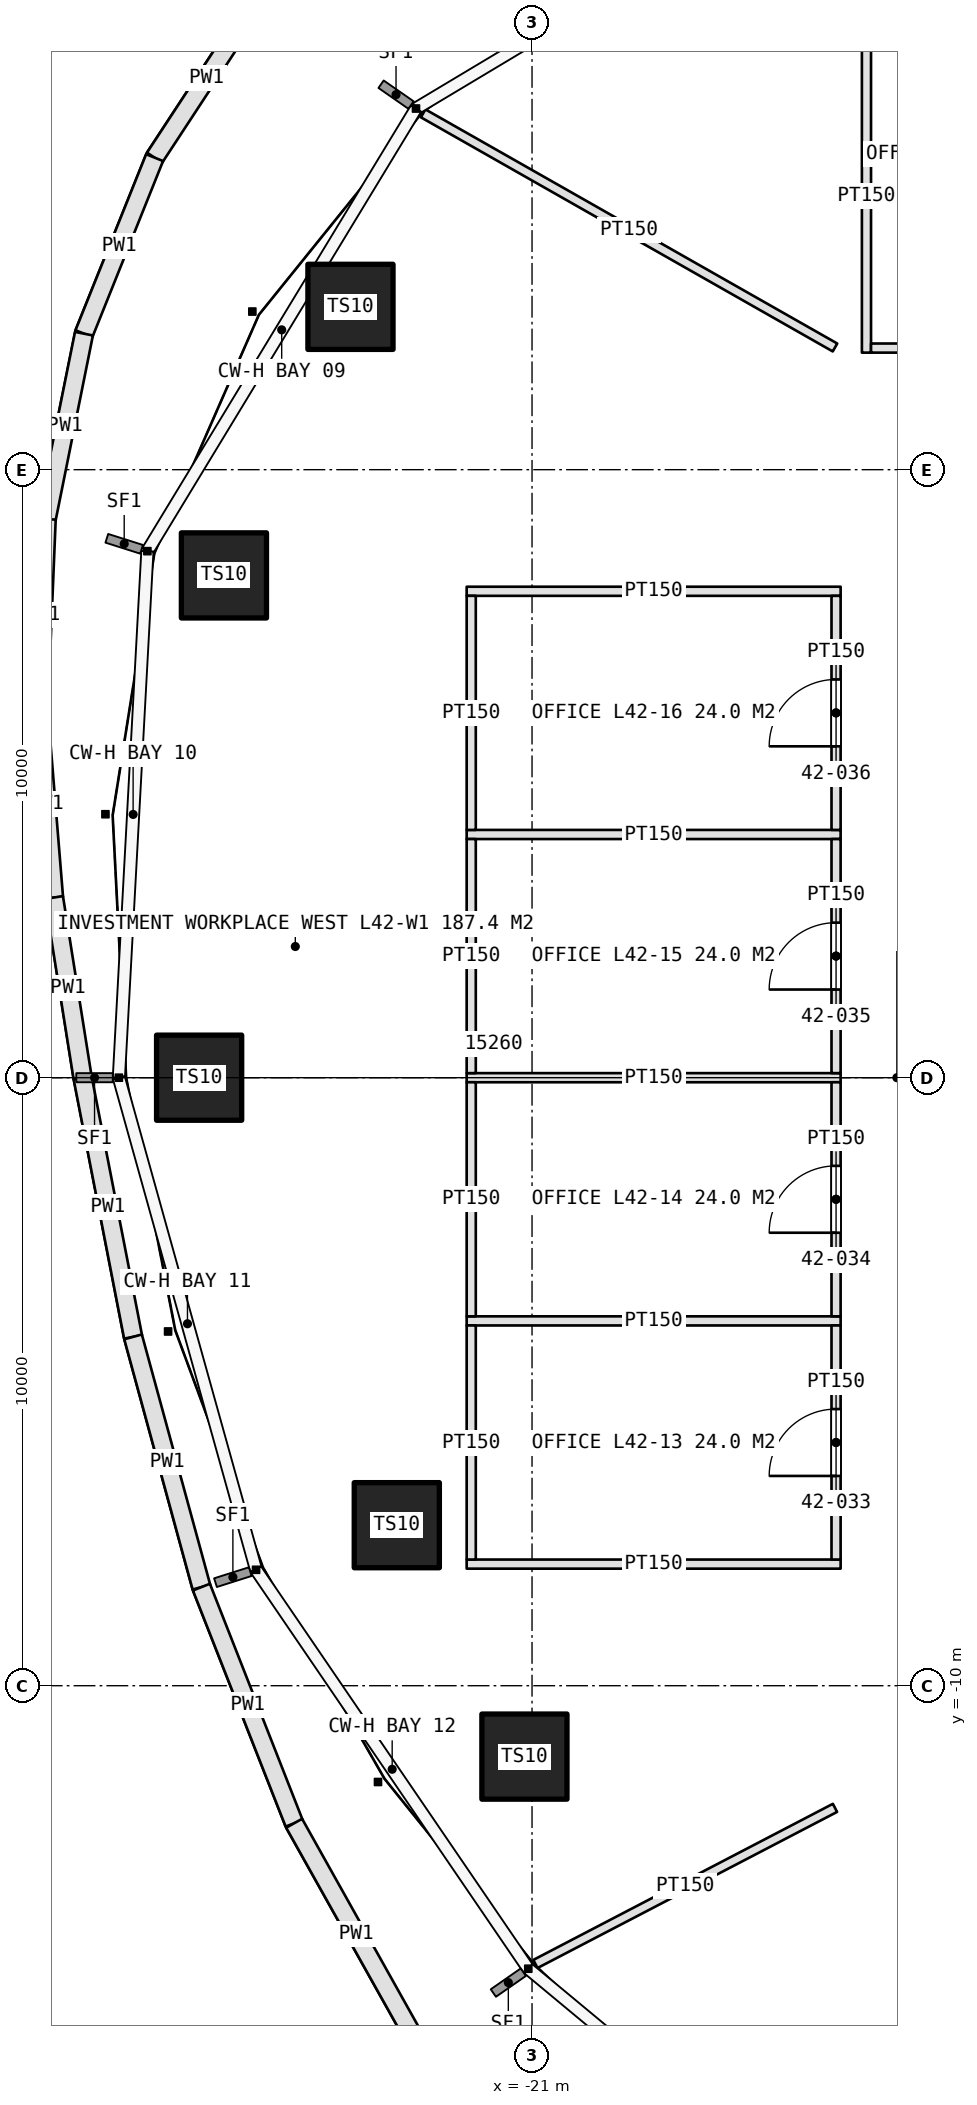
"""IFC4 building model, lengths in metres.
Left out: names, types, materials, properties, quantities, classifications, styles, units other than length and angle.
Written with IfcOpenShell. Run it as: python <this file> out.ifc"""

import sys

from ifc_helpers import new_model, si_unit, direction, frame, frame_2d, origin, origin_2d, place, context, subcontext, project, spatial, rectangle, hollow_rectangle, extrude, element, fill, save


model = new_model("IFC4")
c1 = context("Model", 3, precision=1e-05, world=origin(), true_north=direction((0.0, 1.0)))
c2 = subcontext(c1, "Body", "Model", "MODEL_VIEW")
j1 = project(units=[si_unit("LENGTHUNIT", "METRE"), si_unit("PLANEANGLEUNIT", "RADIAN")], contexts=[c1])
p1 = place(None, origin())
s1 = spatial("IfcSite", under=j1, at=p1, CompositionType="ELEMENT")
p2 = place(p1, origin())
s2 = spatial("IfcBuilding", under=s1, at=p2, CompositionType="ELEMENT")
p3 = place(p2, frame((0.0, 0.0, 194.8)))
s3 = spatial("IfcBuildingStorey", under=s2, at=p3, CompositionType="ELEMENT", Elevation=194.8)
for number, where, z_axis, x_axis in (
    (1, (-23.986, 12.678, 0.775), (0.0, 0.0, 1.0), (1.0, 0.0, 0.0)),
    (2, (-26.067, 8.261, 0.775), (0.0, 0.0, 1.0), (1.0, 0.0, 0.0)),
):
    element("IfcColumn", number, at=place(p3, frame(where, z_axis=z_axis, x_axis=x_axis)), inside=s3, PredefinedType="COLUMN", context=c2, shape_type="SweptSolid", body=[
        extrude(hollow_rectangle(XDim=1.4, YDim=1.4, WallThickness=0.15, at=origin_2d()), origin(), (0.0, 0.0, 1.0), 3.425),
    ])
p4 = place(p3, frame((-26.475, 0.0, 0.0), z_axis=(0.0, 0.0, 1.0), x_axis=(1.0, 0.0, 0.0)))
e3 = element("IfcColumn", 3, at=p4, inside=s3, PredefinedType="COLUMN", context=c2, shape_type="SweptSolid", body=[
    extrude(hollow_rectangle(XDim=1.4, YDim=1.4, WallThickness=0.15, at=origin_2d()), origin(), (0.0, 0.0, 1.0), 4.2),
])
for number, where, z_axis, x_axis in (
    (4, (-23.224, -7.36, 0.775), (0.0, 0.0, 1.0), (1.0, 0.0, 0.0)),
    (5, (-21.125, -11.166, 0.775), (0.0, 0.0, 1.0), (1.0, 0.0, 0.0)),
):
    element("IfcColumn", number, at=place(p3, frame(where, z_axis=z_axis, x_axis=x_axis)), inside=s3, PredefinedType="COLUMN", context=c2, shape_type="SweptSolid", body=[
        extrude(hollow_rectangle(XDim=1.4, YDim=1.4, WallThickness=0.15, at=origin_2d()), origin(), (0.0, 0.0, 1.0), 3.425),
    ])
p5 = place(p3, frame((-25.497, 17.741, 0.0), z_axis=(0.0, 0.0, 1.0), x_axis=(-0.548381186264, -0.836228482265, 0.0)))
e6 = element("IfcWall", 6, at=p5, inside=s3, PredefinedType="PARAPET", context=c2, shape_type="SweptSolid", body=[
    extrude(rectangle(XDim=3.12, YDim=0.3, at=frame_2d((1.56, 0.0))), origin(), (0.0, 0.0, 1.0), 1.1),
])
p6 = place(p3, frame((-27.207, 15.132, 0.0), z_axis=(0.0, 0.0, 1.0), x_axis=(-0.372389026158, -0.928076728076, 0.0)))
e7 = element("IfcWall", 7, at=p6, inside=s3, PredefinedType="PARAPET", context=c2, shape_type="SweptSolid", body=[
    extrude(rectangle(XDim=3.119, YDim=0.3, at=frame_2d((1.56, 0.0))), origin(), (0.0, 0.0, 1.0), 1.1),
])
p7 = place(p3, frame((-28.369, 12.237, 0.0), z_axis=(0.0, 0.0, 1.0), x_axis=(-0.19739792897, -0.980323445419, 0.0)))
e8 = element("IfcWall", 8, at=p7, inside=s3, PredefinedType="PARAPET", context=c2, shape_type="SweptSolid", body=[
    extrude(rectangle(XDim=3.113, YDim=0.3, at=frame_2d((1.557, 0.0))), origin(), (0.0, 0.0, 1.0), 1.1),
])
p8 = place(p3, frame((-28.983, 9.185, 0.0), z_axis=(0.0, 0.0, 1.0), x_axis=(-0.041353010634, -0.9991445984, 0.0)))
e9 = element("IfcWall", 9, at=p8, inside=s3, PredefinedType="PARAPET", context=c2, shape_type="SweptSolid", body=[
    extrude(rectangle(XDim=3.147, YDim=0.3, at=frame_2d((1.573, 0.0))), origin(), (0.0, 0.0, 1.0), 1.1),
])
p9 = place(p3, frame((-29.114, 6.041, 0.0), z_axis=(0.0, 0.0, 1.0), x_axis=(0.081344380579, -0.996686054758, 0.0)))
e10 = element("IfcWall", 10, at=p9, inside=s3, PredefinedType="PARAPET", context=c2, shape_type="SweptSolid", body=[
    extrude(rectangle(XDim=3.088, YDim=0.3, at=frame_2d((1.544, 0.0))), origin(), (0.0, 0.0, 1.0), 1.1),
])
p10 = place(p3, frame((-28.862, 2.963, 0.0), z_axis=(0.0, 0.0, 1.0), x_axis=(0.156965340038, -0.987604111994, 0.0)))
e11 = element("IfcWall", 11, at=p10, inside=s3, PredefinedType="PARAPET", context=c2, shape_type="SweptSolid", body=[
    extrude(rectangle(XDim=3.0, YDim=0.3, at=frame_2d((1.5, 0.0))), origin(), (0.0, 0.0, 1.0), 1.1),
])
p11 = place(p3, frame((-28.391, 0.0, 0.0), z_axis=(0.0, 0.0, 1.0), x_axis=(0.191129953583, -0.981564741035, 0.0)))
e12 = element("IfcWall", 12, at=p11, inside=s3, PredefinedType="PARAPET", context=c2, shape_type="SweptSolid", body=[
    extrude(rectangle(XDim=4.343, YDim=0.3, at=frame_2d((2.171, 0.0))), origin(), (0.0, 0.0, 1.0), 1.1),
])
p12 = place(p3, frame((-27.561, -4.263, 0.0), z_axis=(0.0, 0.0, 1.0), x_axis=(0.263470871908, -0.964667351814, 0.0)))
e13 = element("IfcWall", 13, at=p12, inside=s3, PredefinedType="PARAPET", context=c2, shape_type="SweptSolid", body=[
    extrude(rectangle(XDim=4.266, YDim=0.3, at=frame_2d((2.133, 0.0))), origin(), (0.0, 0.0, 1.0), 1.1),
])
p13 = place(p3, frame((-26.437, -8.378, 0.0), z_axis=(0.0, 0.0, 1.0), x_axis=(0.365502120614, -0.930810506938, 0.0)))
e14 = element("IfcWall", 14, at=p13, inside=s3, PredefinedType="PARAPET", context=c2, shape_type="SweptSolid", body=[
    extrude(rectangle(XDim=4.173, YDim=0.3, at=frame_2d((2.086, 0.0))), origin(), (0.0, 0.0, 1.0), 1.1),
])
p14 = place(p3, frame((-24.912, -12.262, 0.0), z_axis=(0.0, 0.0, 1.0), x_axis=(0.488583818606, -0.872516963844, 0.0)))
e15 = element("IfcWall", 15, at=p14, inside=s3, PredefinedType="PARAPET", context=c2, shape_type="SweptSolid", body=[
    extrude(rectangle(XDim=4.183, YDim=0.3, at=frame_2d((2.091, 0.0))), origin(), (0.0, 0.0, 1.0), 1.1),
])
p15 = place(p3, frame((-15.5, 11.925, 0.0), z_axis=(0.0, 0.0, 1.0), x_axis=(0.0, 1.0, 0.0)))
e16 = element("IfcWall", 16, at=p15, inside=s3, PredefinedType="PARTITIONING", context=c2, shape_type="SweptSolid", body=[
    extrude(rectangle(XDim=5.15, YDim=0.15, at=frame_2d((2.575, 0.0))), origin(), (0.0, 0.0, 1.0), 3.0),
])
p16 = place(p3, frame((-15.425, 12.0, 0.0), z_axis=(0.0, 0.0, 1.0), x_axis=(1.0, 0.0, 0.0)))
e17 = element("IfcWall", 17, at=p16, inside=s3, PredefinedType="PARTITIONING", context=c2, shape_type="SweptSolid", body=[
    extrude(rectangle(XDim=3.85, YDim=0.15, at=frame_2d((1.925, 0.0))), origin(), (0.0, 0.0, 1.0), 3.0),
])
p17 = place(p16, frame((1.375, 0.0, 0.0)))
e18 = element("IfcOpeningElement", 18, at=p17, cuts=e17, PredefinedType="OPENING", context=c2, shape_type="SweptSolid", body=[
    extrude(rectangle(XDim=1.1, YDim=2.3, at=frame_2d((0.55, 1.15))), frame((0.0, 0.085, 0.0), z_axis=(0.0, -1.0, 0.0), x_axis=(1.0, 0.0, 0.0)), (0.0, 0.0, 1.0), 0.17),
])
for number, where, z_axis, x_axis in (
    (19, (-15.925, -8.0, 0.0), (0.0, 0.0, 1.0), (-1.0, 0.0, 0.0)),
    (20, (-15.925, -4.0, 0.0), (0.0, 0.0, 1.0), (-1.0, 0.0, 0.0)),
    (21, (-15.925, 0.0, 0.0), (0.0, 0.0, 1.0), (-1.0, 0.0, 0.0)),
    (22, (-15.925, 4.0, 0.0), (0.0, 0.0, 1.0), (-1.0, 0.0, 0.0)),
    (23, (-15.925, 8.0, 0.0), (0.0, 0.0, 1.0), (-1.0, 0.0, 0.0)),
):
    element("IfcWall", number, at=place(p3, frame(where, z_axis=z_axis, x_axis=x_axis)), inside=s3, PredefinedType="PARTITIONING", context=c2, shape_type="SweptSolid", body=[
        extrude(rectangle(XDim=6.15, YDim=0.15, at=frame_2d((3.075, 0.0))), origin(), (0.0, 0.0, 1.0), 3.0),
    ])
p18 = place(p3, frame((-16.0, -7.925, 0.0), z_axis=(0.0, 0.0, 1.0), x_axis=(0.0, 1.0, 0.0)))
e24 = element("IfcWall", 24, at=p18, inside=s3, PredefinedType="PARTITIONING", context=c2, shape_type="SweptSolid", body=[
    extrude(rectangle(XDim=3.85, YDim=0.15, at=frame_2d((1.925, 0.0))), origin(), (0.0, 0.0, 1.0), 3.0),
])
p19 = place(p18, frame((1.375, 0.0, 0.0)))
e25 = element("IfcOpeningElement", 25, at=p19, cuts=e24, PredefinedType="OPENING", context=c2, shape_type="SweptSolid", body=[
    extrude(rectangle(XDim=1.1, YDim=2.3, at=frame_2d((0.55, 1.15))), frame((0.0, 0.085, 0.0), z_axis=(0.0, -1.0, 0.0), x_axis=(1.0, 0.0, 0.0)), (0.0, 0.0, 1.0), 0.17),
])
p20 = place(p3, frame((-22.0, -7.925, 0.0), z_axis=(0.0, 0.0, 1.0), x_axis=(0.0, 1.0, 0.0)))
e26 = element("IfcWall", 26, at=p20, inside=s3, PredefinedType="PARTITIONING", context=c2, shape_type="SweptSolid", body=[
    extrude(rectangle(XDim=3.85, YDim=0.15, at=frame_2d((1.925, 0.0))), origin(), (0.0, 0.0, 1.0), 3.0),
])
p21 = place(p3, frame((-16.0, -3.925, 0.0), z_axis=(0.0, 0.0, 1.0), x_axis=(0.0, 1.0, 0.0)))
e27 = element("IfcWall", 27, at=p21, inside=s3, PredefinedType="PARTITIONING", context=c2, shape_type="SweptSolid", body=[
    extrude(rectangle(XDim=3.85, YDim=0.15, at=frame_2d((1.925, 0.0))), origin(), (0.0, 0.0, 1.0), 3.0),
])
p22 = place(p21, frame((1.375, 0.0, 0.0)))
e28 = element("IfcOpeningElement", 28, at=p22, cuts=e27, PredefinedType="OPENING", context=c2, shape_type="SweptSolid", body=[
    extrude(rectangle(XDim=1.1, YDim=2.3, at=frame_2d((0.55, 1.15))), frame((0.0, 0.085, 0.0), z_axis=(0.0, -1.0, 0.0), x_axis=(1.0, 0.0, 0.0)), (0.0, 0.0, 1.0), 0.17),
])
p23 = place(p3, frame((-22.0, -3.925, 0.0), z_axis=(0.0, 0.0, 1.0), x_axis=(0.0, 1.0, 0.0)))
e29 = element("IfcWall", 29, at=p23, inside=s3, PredefinedType="PARTITIONING", context=c2, shape_type="SweptSolid", body=[
    extrude(rectangle(XDim=3.85, YDim=0.15, at=frame_2d((1.925, 0.0))), origin(), (0.0, 0.0, 1.0), 3.0),
])
p24 = place(p3, frame((-16.0, 0.075, 0.0), z_axis=(0.0, 0.0, 1.0), x_axis=(0.0, 1.0, 0.0)))
e30 = element("IfcWall", 30, at=p24, inside=s3, PredefinedType="PARTITIONING", context=c2, shape_type="SweptSolid", body=[
    extrude(rectangle(XDim=3.85, YDim=0.15, at=frame_2d((1.925, 0.0))), origin(), (0.0, 0.0, 1.0), 3.0),
])
p25 = place(p24, frame((1.375, 0.0, 0.0)))
e31 = element("IfcOpeningElement", 31, at=p25, cuts=e30, PredefinedType="OPENING", context=c2, shape_type="SweptSolid", body=[
    extrude(rectangle(XDim=1.1, YDim=2.3, at=frame_2d((0.55, 1.15))), frame((0.0, 0.085, 0.0), z_axis=(0.0, -1.0, 0.0), x_axis=(1.0, 0.0, 0.0)), (0.0, 0.0, 1.0), 0.17),
])
p26 = place(p3, frame((-22.0, 0.075, 0.0), z_axis=(0.0, 0.0, 1.0), x_axis=(0.0, 1.0, 0.0)))
e32 = element("IfcWall", 32, at=p26, inside=s3, PredefinedType="PARTITIONING", context=c2, shape_type="SweptSolid", body=[
    extrude(rectangle(XDim=3.85, YDim=0.15, at=frame_2d((1.925, 0.0))), origin(), (0.0, 0.0, 1.0), 3.0),
])
p27 = place(p3, frame((-16.0, 4.075, 0.0), z_axis=(0.0, 0.0, 1.0), x_axis=(0.0, 1.0, 0.0)))
e33 = element("IfcWall", 33, at=p27, inside=s3, PredefinedType="PARTITIONING", context=c2, shape_type="SweptSolid", body=[
    extrude(rectangle(XDim=3.85, YDim=0.15, at=frame_2d((1.925, 0.0))), origin(), (0.0, 0.0, 1.0), 3.0),
])
p28 = place(p27, frame((1.375, 0.0, 0.0)))
e34 = element("IfcOpeningElement", 34, at=p28, cuts=e33, PredefinedType="OPENING", context=c2, shape_type="SweptSolid", body=[
    extrude(rectangle(XDim=1.1, YDim=2.3, at=frame_2d((0.55, 1.15))), frame((0.0, 0.085, 0.0), z_axis=(0.0, -1.0, 0.0), x_axis=(1.0, 0.0, 0.0)), (0.0, 0.0, 1.0), 0.17),
])
p29 = place(p3, frame((-22.0, 4.075, 0.0), z_axis=(0.0, 0.0, 1.0), x_axis=(0.0, 1.0, 0.0)))
e35 = element("IfcWall", 35, at=p29, inside=s3, PredefinedType="PARTITIONING", context=c2, shape_type="SweptSolid", body=[
    extrude(rectangle(XDim=3.85, YDim=0.15, at=frame_2d((1.925, 0.0))), origin(), (0.0, 0.0, 1.0), 3.0),
])
p30 = place(p3, frame((-16.018, -12.009, 0.0), z_axis=(0.0, 0.0, 1.0), x_axis=(-0.886831549241, -0.462092851351, 0.0)))
e36 = element("IfcWall", 36, at=p30, inside=s3, PredefinedType="PARTITIONING", context=c2, shape_type="SweptSolid", body=[
    extrude(rectangle(XDim=5.555, YDim=0.15, at=frame_2d((2.778, 0.0))), origin(), (0.0, 0.0, 1.0), 3.0),
])
p31 = place(p3, frame((-16.017, 12.01, 0.0), z_axis=(0.0, 0.0, 1.0), x_axis=(-0.869357432803, 0.494183826151, 0.0)))
e37 = element("IfcWall", 37, at=p31, inside=s3, PredefinedType="PARTITIONING", context=c2, shape_type="SweptSolid", body=[
    extrude(rectangle(XDim=7.791, YDim=0.15, at=frame_2d((3.896, 0.0))), origin(), (0.0, 0.0, 1.0), 3.0),
])
p32 = place(p19, origin())
e38 = element("IfcDoor", 38, at=p32, inside=s3, OperationType="SINGLE_SWING_LEFT", PredefinedType="DOOR", context=c2, shape_type="SweptSolid", body=[
    extrude(rectangle(XDim=1.1, YDim=2.3, at=frame_2d((0.55, 1.15))), frame((0.0, 0.025, 0.0), z_axis=(0.0, -1.0, 0.0), x_axis=(1.0, 0.0, 0.0)), (0.0, 0.0, 1.0), 0.05),
])
fill(e25, e38)
p33 = place(p22, origin())
e39 = element("IfcDoor", 39, at=p33, inside=s3, OperationType="SINGLE_SWING_LEFT", PredefinedType="DOOR", context=c2, shape_type="SweptSolid", body=[
    extrude(rectangle(XDim=1.1, YDim=2.3, at=frame_2d((0.55, 1.15))), frame((0.0, 0.025, 0.0), z_axis=(0.0, -1.0, 0.0), x_axis=(1.0, 0.0, 0.0)), (0.0, 0.0, 1.0), 0.05),
])
fill(e28, e39)
p34 = place(p25, origin())
e40 = element("IfcDoor", 40, at=p34, inside=s3, OperationType="SINGLE_SWING_LEFT", PredefinedType="DOOR", context=c2, shape_type="SweptSolid", body=[
    extrude(rectangle(XDim=1.1, YDim=2.3, at=frame_2d((0.55, 1.15))), frame((0.0, 0.025, 0.0), z_axis=(0.0, -1.0, 0.0), x_axis=(1.0, 0.0, 0.0)), (0.0, 0.0, 1.0), 0.05),
])
fill(e31, e40)
p35 = place(p28, origin())
e41 = element("IfcDoor", 41, at=p35, inside=s3, OperationType="SINGLE_SWING_LEFT", PredefinedType="DOOR", context=c2, shape_type="SweptSolid", body=[
    extrude(rectangle(XDim=1.1, YDim=2.3, at=frame_2d((0.55, 1.15))), frame((0.0, 0.025, 0.0), z_axis=(0.0, -1.0, 0.0), x_axis=(1.0, 0.0, 0.0)), (0.0, 0.0, 1.0), 0.05),
])
fill(e34, e41)
save(model, sys.argv[1])
